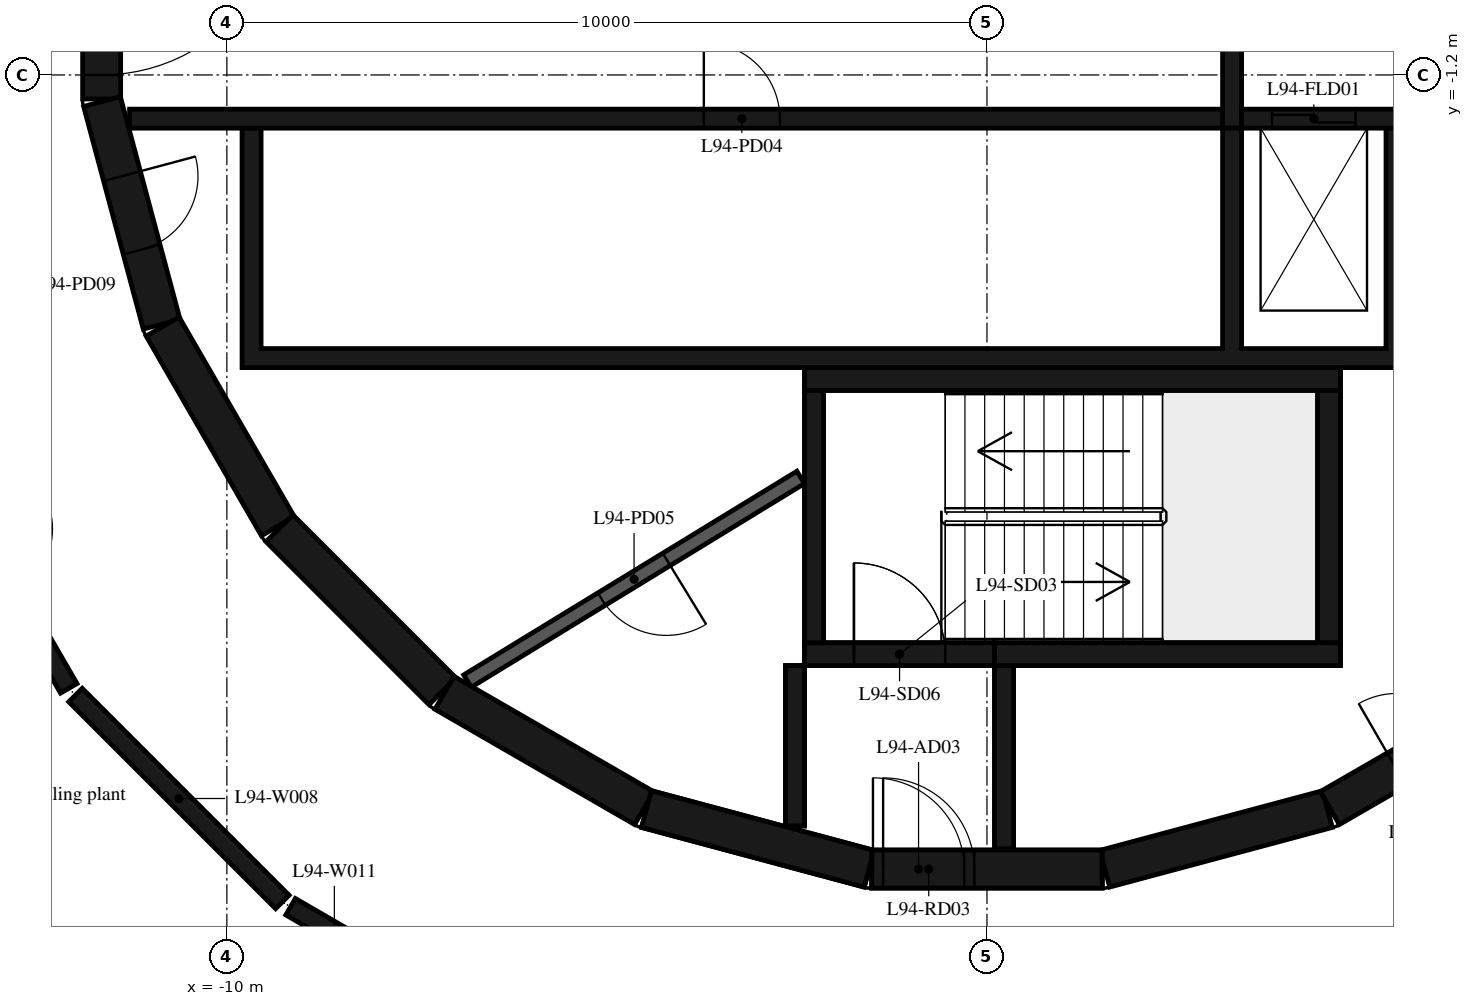
"""IFC4 building model, lengths in metres.
Left out: names, types, materials, properties, quantities, classifications, styles, units other than length and angle.
Written with IfcOpenShell. Run it as: python <this file> out.ifc"""

import sys

from ifc_helpers import new_model, si_unit, direction, frame, frame_2d, origin, place, context, subcontext, project, spatial, polyline, rectangle, outline, extrude, element, fill, save


model = new_model("IFC4")
c1 = context("Model", 3, precision=1e-05, world=origin(), true_north=direction((0.0, 1.0)))
c2 = subcontext(c1, "Body", "Model", "MODEL_VIEW")
j1 = project(units=[si_unit("LENGTHUNIT", "METRE"), si_unit("PLANEANGLEUNIT", "RADIAN")], contexts=[c1])
p1 = place(None, origin())
s1 = spatial("IfcSite", under=j1, at=p1, CompositionType="ELEMENT")
p2 = place(p1, origin())
s2 = spatial("IfcBuilding", under=s1, at=p2, CompositionType="ELEMENT")
p3 = place(p2, frame((0.0, 0.0, 366.2)))
s3 = spatial("IfcBuildingStorey", under=s2, at=p3, CompositionType="ELEMENT", Elevation=366.2)
p4 = place(p3, frame((1.55, -11.643, 0.0), z_axis=(0.0, 0.0, 1.0), x_axis=(0.965948410781, 0.258734743916, 0.0)))
e1 = element("IfcWall", 1, at=p4, inside=s3, PredefinedType="SHEAR", context=c2, shape_type="SweptSolid", body=[
    extrude(rectangle(XDim=3.033, YDim=0.5, at=frame_2d((1.516, 0.0))), origin(), (0.0, 0.0, 1.0), 4.8),
])
p5 = place(p3, frame((4.51, -10.845, 0.0), z_axis=(0.0, 0.0, 1.0), x_axis=(0.865975092491, 0.500087131594, 0.0)))
e2 = element("IfcWall", 2, at=p5, inside=s3, PredefinedType="SHEAR", context=c2, shape_type="SweptSolid", body=[
    extrude(rectangle(XDim=3.033, YDim=0.5, at=frame_2d((1.516, 0.0))), origin(), (0.0, 0.0, 1.0), 4.8),
])
p6 = place(p5, frame((1.016, 0.0, 0.0)))
e3 = element("IfcOpeningElement", 3, at=p6, cuts=e2, PredefinedType="OPENING", context=c2, shape_type="SweptSolid", body=[
    extrude(rectangle(XDim=1.0, YDim=2.4, at=frame_2d((0.5, 1.2))), frame((0.0, 0.26, 0.0), z_axis=(0.0, -1.0, 0.0), x_axis=(1.0, 0.0, 0.0)), (0.0, 0.0, 1.0), 0.52),
])
p7 = place(p3, frame((-11.647, 1.516, 0.0), z_axis=(0.0, 0.0, 1.0), x_axis=(0.0, -1.0, 0.0)))
e4 = element("IfcWall", 4, at=p7, inside=s3, PredefinedType="SHEAR", context=c2, shape_type="SweptSolid", body=[
    extrude(rectangle(XDim=3.033, YDim=0.5, at=frame_2d((1.516, 0.0))), origin(), (0.0, 0.0, 1.0), 4.8),
])
p8 = place(p7, frame((0.316, 0.0, 0.0)))
e5 = element("IfcOpeningElement", 5, at=p8, cuts=e4, PredefinedType="OPENING", context=c2, shape_type="SweptSolid", body=[
    extrude(rectangle(XDim=2.4, YDim=2.1, at=frame_2d((1.2, 1.05))), frame((0.0, 0.26, 0.0), z_axis=(0.0, -1.0, 0.0), x_axis=(1.0, 0.0, 0.0)), (0.0, 0.0, 1.0), 0.52),
])
p9 = place(p3, frame((-11.643, -1.55, 0.0), z_axis=(0.0, 0.0, 1.0), x_axis=(0.258734743916, -0.965948410781, 0.0)))
e6 = element("IfcWall", 6, at=p9, inside=s3, PredefinedType="SHEAR", context=c2, shape_type="SweptSolid", body=[
    extrude(rectangle(XDim=3.033, YDim=0.5, at=frame_2d((1.516, 0.0))), origin(), (0.0, 0.0, 1.0), 4.8),
])
p10 = place(p9, frame((1.016, 0.0, 0.0)))
e7 = element("IfcOpeningElement", 7, at=p10, cuts=e6, PredefinedType="OPENING", context=c2, shape_type="SweptSolid", body=[
    extrude(rectangle(XDim=1.0, YDim=2.4, at=frame_2d((0.5, 1.2))), frame((0.0, 0.26, 0.0), z_axis=(0.0, -1.0, 0.0), x_axis=(1.0, 0.0, 0.0)), (0.0, 0.0, 1.0), 0.52),
])
p11 = place(p3, frame((-10.845, -4.51, 0.0), z_axis=(0.0, 0.0, 1.0), x_axis=(0.500087131594, -0.865975092491, 0.0)))
e8 = element("IfcWall", 8, at=p11, inside=s3, PredefinedType="SHEAR", context=c2, shape_type="SweptSolid", body=[
    extrude(rectangle(XDim=3.033, YDim=0.5, at=frame_2d((1.516, 0.0))), origin(), (0.0, 0.0, 1.0), 4.8),
])
p12 = place(p3, frame((-9.308, -7.164, 0.0), z_axis=(0.0, 0.0, 1.0), x_axis=(0.707106781187, -0.707106781187, 0.0)))
e9 = element("IfcWall", 9, at=p12, inside=s3, PredefinedType="SHEAR", context=c2, shape_type="SweptSolid", body=[
    extrude(rectangle(XDim=3.032, YDim=0.5, at=frame_2d((1.516, 0.0))), origin(), (0.0, 0.0, 1.0), 4.8),
])
for number, where, z_axis, x_axis in (
    (10, (-7.137, -9.329, 0.0), (0.0, 0.0, 1.0), (0.866, -0.5, 0.0)),
    (11, (-4.479, -10.858, 0.0), (0.0, 0.0, 1.0), (0.966, -0.259, 0.0)),
):
    element("IfcWall", number, at=place(p3, frame(where, z_axis=z_axis, x_axis=x_axis)), inside=s3, PredefinedType="SHEAR", context=c2, shape_type="SweptSolid", body=[
        extrude(rectangle(XDim=3.033, YDim=0.5, at=frame_2d((1.516, 0.0))), origin(), (0.0, 0.0, 1.0), 4.8),
    ])
p13 = place(p3, frame((-1.516, -11.647, 0.0), z_axis=(0.0, 0.0, 1.0), x_axis=(1.0, 0.0, 0.0)))
e12 = element("IfcWall", 12, at=p13, inside=s3, PredefinedType="SHEAR", context=c2, shape_type="SweptSolid", body=[
    extrude(rectangle(XDim=3.033, YDim=0.5, at=frame_2d((1.516, 0.0))), origin(), (0.0, 0.0, 1.0), 4.8),
])
p14 = place(p13, frame((0.016, 0.0, 0.0)))
e13 = element("IfcOpeningElement", 13, at=p14, cuts=e12, PredefinedType="OPENING", context=c2, shape_type="SweptSolid", body=[
    extrude(rectangle(XDim=1.2, YDim=2.1, at=frame_2d((0.6, 1.05))), frame((0.0, 0.26, 0.0), z_axis=(0.0, -1.0, 0.0), x_axis=(1.0, 0.0, 0.0)), (0.0, 0.0, 1.0), 0.52),
])
p15 = place(p3, frame((-2.275, -8.67, 0.0), z_axis=(0.0, 0.0, 1.0), x_axis=(0.0, 1.0, 0.0)))
e14 = element("IfcWall", 14, at=p15, inside=s3, PredefinedType="SHEAR", context=c2, shape_type="SweptSolid", body=[
    extrude(rectangle(XDim=3.32, YDim=0.25, at=frame_2d((1.66, 0.0))), origin(), (0.0, 0.0, 1.0), 4.8),
])
p16 = place(p3, frame((-2.4, -5.2, 0.0), z_axis=(0.0, 0.0, 1.0), x_axis=(1.0, 0.0, 0.0)))
e15 = element("IfcWall", 15, at=p16, inside=s3, PredefinedType="SHEAR", context=c2, shape_type="SweptSolid", body=[
    extrude(rectangle(XDim=7.05, YDim=0.3, at=frame_2d((3.525, 0.0))), origin(), (0.0, 0.0, 1.0), 4.8),
])
p17 = place(p3, frame((4.5, -8.67, 0.0), z_axis=(0.0, 0.0, 1.0), x_axis=(0.0, 1.0, 0.0)))
e16 = element("IfcWall", 16, at=p17, inside=s3, PredefinedType="SHEAR", context=c2, shape_type="SweptSolid", body=[
    extrude(rectangle(XDim=3.32, YDim=0.3, at=frame_2d((1.66, 0.0))), origin(), (0.0, 0.0, 1.0), 4.8),
])
p18 = place(p3, frame((0.1, -8.82, 0.0), z_axis=(0.0, 0.0, 1.0), x_axis=(1.0, 0.0, 0.0)))
e17 = element("IfcWall", 17, at=p18, inside=s3, PredefinedType="SHEAR", context=c2, shape_type="SweptSolid", body=[
    extrude(rectangle(XDim=4.55, YDim=0.3, at=frame_2d((2.275, 0.0))), origin(), (0.0, 0.0, 1.0), 4.8),
])
p19 = place(p3, frame((-2.4, -8.82, 0.0), z_axis=(0.0, 0.0, 1.0), x_axis=(1.0, 0.0, 0.0)))
e18 = element("IfcWall", 18, at=p19, inside=s3, PredefinedType="SHEAR", context=c2, shape_type="SweptSolid", body=[
    extrude(rectangle(XDim=2.5, YDim=0.3, at=frame_2d((1.25, 0.0))), origin(), (0.0, 0.0, 1.0), 4.8),
])
p20 = place(p19, frame((0.65, 0.0, 0.0)))
e19 = element("IfcOpeningElement", 19, at=p20, cuts=e18, PredefinedType="OPENING", context=c2, shape_type="SweptSolid", body=[
    extrude(rectangle(XDim=1.2, YDim=2.1, at=frame_2d((0.6, 1.05))), frame((0.0, 0.16, 0.0), z_axis=(0.0, -1.0, 0.0), x_axis=(1.0, 0.0, 0.0)), (0.0, 0.0, 1.0), 0.32),
])
p21 = place(p3, frame((-2.525, -8.97, 0.0), z_axis=(0.0, 0.0, 1.0), x_axis=(0.0, -1.0, 0.0)))
e20 = element("IfcWall", 20, at=p21, inside=s3, PredefinedType="SHEAR", context=c2, shape_type="SweptSolid", body=[
    extrude(rectangle(XDim=2.11, YDim=0.25, at=frame_2d((1.055, 0.0))), origin(), (0.0, 0.0, 1.0), 4.8),
])
p22 = place(p3, frame((0.225, -8.97, 0.0), z_axis=(0.0, 0.0, 1.0), x_axis=(0.0, -1.0, 0.0)))
e21 = element("IfcWall", 21, at=p22, inside=s3, PredefinedType="SHEAR", context=c2, shape_type="SweptSolid", body=[
    extrude(rectangle(XDim=2.41, YDim=0.25, at=frame_2d((1.205, 0.0))), origin(), (0.0, 0.0, 1.0), 4.8),
])
p23 = place(p3, origin())
e22 = element("IfcWall", 22, at=p23, inside=s3, PredefinedType="SHEAR", context=c2, shape_type="SweptSolid", body=[
    extrude(outline(polyline([(9.8, -4.8), (9.8, -1.9), (9.55, -1.9), (9.55, -4.8), (7.65, -4.8), (7.65, -1.9), (7.4, -1.9), (7.4, -4.8), (5.5, -4.8), (5.5, -1.9), (5.25, -1.9), (5.25, -4.8), (3.35, -4.8), (3.35, -1.9), (3.1, -1.9), (3.1, -4.8), (-9.55, -4.8), (-9.55, -1.9), (-9.8, -1.9), (-9.8, -4.8), (-9.8, -5.05), (9.8, -5.05), (9.8, -4.8)])), origin(), (0.0, 0.0, 1.0), 4.8),
])
p24 = place(p3, frame((-11.28, -1.775, 0.0), z_axis=(0.0, 0.0, 1.0), x_axis=(1.0, 0.0, 0.0)))
e23 = element("IfcWall", 23, at=p24, inside=s3, PredefinedType="SHEAR", context=c2, shape_type="SweptSolid", body=[
    extrude(rectangle(XDim=14.38, YDim=0.25, at=frame_2d((7.19, 0.0))), origin(), (0.0, 0.0, 1.0), 4.8),
])
p25 = place(p24, frame((7.555, 0.0, 0.0)))
e24 = element("IfcOpeningElement", 24, at=p25, cuts=e23, PredefinedType="OPENING", context=c2, shape_type="SweptSolid", body=[
    extrude(rectangle(XDim=1.0, YDim=2.4, at=frame_2d((0.5, 1.2))), frame((0.0, 0.135, 0.0), z_axis=(0.0, -1.0, 0.0), x_axis=(1.0, 0.0, 0.0)), (0.0, 0.0, 1.0), 0.27),
])
p26 = place(p3, frame((3.35, -1.775, 0.0), z_axis=(0.0, 0.0, 1.0), x_axis=(1.0, 0.0, 0.0)))
e25 = element("IfcWall", 25, at=p26, inside=s3, PredefinedType="SHEAR", context=c2, shape_type="SweptSolid", body=[
    extrude(rectangle(XDim=7.93, YDim=0.25, at=frame_2d((3.965, 0.0))), origin(), (0.0, 0.0, 1.0), 4.8),
])
p27 = place(p26, frame((0.4, 0.0, 0.0)))
e26 = element("IfcOpeningElement", 26, at=p27, cuts=e25, PredefinedType="OPENING", context=c2, shape_type="SweptSolid", body=[
    extrude(rectangle(XDim=1.1, YDim=2.4, at=frame_2d((0.55, 1.2))), frame((0.0, 0.135, 0.0), z_axis=(0.0, -1.0, 0.0), x_axis=(1.0, 0.0, 0.0)), (0.0, 0.0, 1.0), 0.27),
])
p28 = place(p26, frame((2.55, 0.0, 0.0)))
e27 = element("IfcOpeningElement", 27, at=p28, cuts=e25, PredefinedType="OPENING", context=c2, shape_type="SweptSolid", body=[
    extrude(rectangle(XDim=1.1, YDim=2.4, at=frame_2d((0.55, 1.2))), frame((0.0, 0.135, 0.0), z_axis=(0.0, -1.0, 0.0), x_axis=(1.0, 0.0, 0.0)), (0.0, 0.0, 1.0), 0.27),
])
p29 = place(p26, frame((4.7, 0.0, 0.0)))
e28 = element("IfcOpeningElement", 28, at=p29, cuts=e25, PredefinedType="OPENING", context=c2, shape_type="SweptSolid", body=[
    extrude(rectangle(XDim=1.1, YDim=2.4, at=frame_2d((0.55, 1.2))), frame((0.0, 0.135, 0.0), z_axis=(0.0, -1.0, 0.0), x_axis=(1.0, 0.0, 0.0)), (0.0, 0.0, 1.0), 0.27),
])
p30 = place(p3, frame((3.225, -1.9, 0.0), z_axis=(0.0, 0.0, 1.0), x_axis=(0.0, 1.0, 0.0)))
e29 = element("IfcWall", 29, at=p30, inside=s3, PredefinedType="SHEAR", context=c2, shape_type="SweptSolid", body=[
    extrude(rectangle(XDim=3.8, YDim=0.25, at=frame_2d((1.9, 0.0))), origin(), (0.0, 0.0, 1.0), 4.8),
])
p31 = place(p3, frame((-2.451, -6.495, 0.0), z_axis=(0.0, 0.0, 1.0), x_axis=(-0.853250115418, -0.521501908471, 0.0)))
e30 = element("IfcWall", 30, at=p31, inside=s3, PredefinedType="PARTITIONING", context=c2, shape_type="SweptSolid", body=[
    extrude(rectangle(XDim=5.137, YDim=0.19, at=frame_2d((2.569, 0.0))), origin(), (0.0, 0.0, 1.0), 4.8),
])
p32 = place(p31, frame((2.069, 0.0, 0.0)))
e31 = element("IfcOpeningElement", 31, at=p32, cuts=e30, PredefinedType="OPENING", context=c2, shape_type="SweptSolid", body=[
    extrude(rectangle(XDim=1.0, YDim=2.4, at=frame_2d((0.5, 1.2))), frame((0.0, 0.105, 0.0), z_axis=(0.0, -1.0, 0.0), x_axis=(1.0, 0.0, 0.0)), (0.0, 0.0, 1.0), 0.21),
])
p33 = place(p3, frame((-2.275, -8.67, 5.2), z_axis=(0.0, 0.0, 1.0), x_axis=(0.0, 1.0, 0.0)))
e32 = element("IfcWall", 32, at=p33, inside=s3, PredefinedType="SHEAR", context=c2, shape_type="SweptSolid", body=[
    extrude(rectangle(XDim=3.32, YDim=0.25, at=frame_2d((1.66, 0.0))), origin(), (0.0, 0.0, 1.0), 3.4),
])
p34 = place(p3, frame((-2.4, -5.2, 5.2), z_axis=(0.0, 0.0, 1.0), x_axis=(1.0, 0.0, 0.0)))
e33 = element("IfcWall", 33, at=p34, inside=s3, PredefinedType="SHEAR", context=c2, shape_type="SweptSolid", body=[
    extrude(rectangle(XDim=7.05, YDim=0.3, at=frame_2d((3.525, 0.0))), origin(), (0.0, 0.0, 1.0), 3.4),
])
p35 = place(p3, frame((4.5, -8.67, 5.2), z_axis=(0.0, 0.0, 1.0), x_axis=(0.0, 1.0, 0.0)))
e34 = element("IfcWall", 34, at=p35, inside=s3, PredefinedType="SHEAR", context=c2, shape_type="SweptSolid", body=[
    extrude(rectangle(XDim=3.32, YDim=0.3, at=frame_2d((1.66, 0.0))), origin(), (0.0, 0.0, 1.0), 3.4),
])
p36 = place(p3, frame((0.1, -8.82, 5.2), z_axis=(0.0, 0.0, 1.0), x_axis=(1.0, 0.0, 0.0)))
e35 = element("IfcWall", 35, at=p36, inside=s3, PredefinedType="SHEAR", context=c2, shape_type="SweptSolid", body=[
    extrude(rectangle(XDim=4.55, YDim=0.3, at=frame_2d((2.275, 0.0))), origin(), (0.0, 0.0, 1.0), 3.4),
])
p37 = place(p3, frame((-2.4, -8.82, 5.2), z_axis=(0.0, 0.0, 1.0), x_axis=(1.0, 0.0, 0.0)))
e36 = element("IfcWall", 36, at=p37, inside=s3, PredefinedType="SHEAR", context=c2, shape_type="SweptSolid", body=[
    extrude(rectangle(XDim=2.5, YDim=0.3, at=frame_2d((1.25, 0.0))), origin(), (0.0, 0.0, 1.0), 3.4),
])
p38 = place(p37, frame((0.65, 0.0, 0.0)))
e37 = element("IfcOpeningElement", 37, at=p38, cuts=e36, PredefinedType="OPENING", context=c2, shape_type="SweptSolid", body=[
    extrude(rectangle(XDim=1.2, YDim=2.1, at=frame_2d((0.6, 1.05))), frame((0.0, 0.16, 0.0), z_axis=(0.0, -1.0, 0.0), x_axis=(1.0, 0.0, 0.0)), (0.0, 0.0, 1.0), 0.32),
])
p39 = place(p3, frame((-2.525, -8.97, 5.2), z_axis=(0.0, 0.0, 1.0), x_axis=(0.0, -1.0, 0.0)))
e38 = element("IfcWall", 38, at=p39, inside=s3, PredefinedType="SHEAR", context=c2, shape_type="SweptSolid", body=[
    extrude(rectangle(XDim=2.11, YDim=0.25, at=frame_2d((1.055, 0.0))), origin(), (0.0, 0.0, 1.0), 3.4),
])
p40 = place(p3, frame((0.225, -8.97, 5.2), z_axis=(0.0, 0.0, 1.0), x_axis=(0.0, -1.0, 0.0)))
e39 = element("IfcWall", 39, at=p40, inside=s3, PredefinedType="SHEAR", context=c2, shape_type="SweptSolid", body=[
    extrude(rectangle(XDim=2.41, YDim=0.25, at=frame_2d((1.205, 0.0))), origin(), (0.0, 0.0, 1.0), 3.4),
])
p41 = place(p3, frame((-4.479, -10.858, 5.2), z_axis=(0.0, 0.0, 1.0), x_axis=(0.965948410781, -0.258734743916, 0.0)))
e40 = element("IfcWall", 40, at=p41, inside=s3, PredefinedType="SHEAR", context=c2, shape_type="SweptSolid", body=[
    extrude(rectangle(XDim=3.033, YDim=0.5, at=frame_2d((1.516, 0.0))), origin(), (0.0, 0.0, 1.0), 3.4),
])
p42 = place(p3, frame((-1.516, -11.647, 5.2), z_axis=(0.0, 0.0, 1.0), x_axis=(1.0, 0.0, 0.0)))
e41 = element("IfcWall", 41, at=p42, inside=s3, PredefinedType="SHEAR", context=c2, shape_type="SweptSolid", body=[
    extrude(rectangle(XDim=3.033, YDim=0.5, at=frame_2d((1.516, 0.0))), origin(), (0.0, 0.0, 1.0), 3.4),
])
p43 = place(p42, frame((0.15, 0.0, 0.0)))
e42 = element("IfcOpeningElement", 42, at=p43, cuts=e41, PredefinedType="OPENING", context=c2, shape_type="SweptSolid", body=[
    extrude(rectangle(XDim=1.2, YDim=2.1, at=frame_2d((0.6, 1.05))), frame((0.0, 0.26, 0.0), z_axis=(0.0, -1.0, 0.0), x_axis=(1.0, 0.0, 0.0)), (0.0, 0.0, 1.0), 0.52),
])
p44 = place(p3, frame((-14.007, -5.938, 0.0), z_axis=(0.0, 0.0, 1.0), x_axis=(0.500708693508, -0.865615852585, 0.0)))
e43 = element("IfcWall", 43, at=p44, inside=s3, PredefinedType="PARTITIONING", context=c2, shape_type="SweptSolid", body=[
    extrude(rectangle(XDim=3.849, YDim=0.25, at=frame_2d((1.925, 0.0))), origin(), (0.0, 0.0, 1.0), 4.8),
])
p45 = place(p44, frame((1.425, 0.0, 0.0)))
e44 = element("IfcOpeningElement", 44, at=p45, cuts=e43, PredefinedType="OPENING", context=c2, shape_type="SweptSolid", body=[
    extrude(rectangle(XDim=1.0, YDim=2.1, at=frame_2d((0.5, 1.05))), frame((0.0, 0.135, 0.0), z_axis=(0.0, -1.0, 0.0), x_axis=(1.0, 0.0, 0.0)), (0.0, 0.0, 1.0), 0.27),
])
p46 = place(p3, frame((-11.992, -9.358, 0.0), z_axis=(0.0, 0.0, 1.0), x_axis=(0.707106781187, -0.707106781187, 0.0)))
e45 = element("IfcWall", 45, at=p46, inside=s3, PredefinedType="PARTITIONING", context=c2, shape_type="SweptSolid", body=[
    extrude(rectangle(XDim=3.849, YDim=0.25, at=frame_2d((1.925, 0.0))), origin(), (0.0, 0.0, 1.0), 4.8),
])
p47 = place(p3, frame((-9.162, -12.143, 0.0), z_axis=(0.0, 0.0, 1.0), x_axis=(0.865225325987, -0.501383221968, 0.0)))
e46 = element("IfcWall", 46, at=p47, inside=s3, PredefinedType="PARTITIONING", context=c2, shape_type="SweptSolid", body=[
    extrude(rectangle(XDim=1.331, YDim=0.25, at=frame_2d((0.666, 0.0))), origin(), (0.0, 0.0, 1.0), 4.8),
])
p48 = place(p20, origin())
e47 = element("IfcDoor", 47, at=p48, inside=s3, OperationType="SINGLE_SWING_LEFT", PredefinedType="DOOR", context=c2, shape_type="SweptSolid", body=[
    extrude(rectangle(XDim=1.2, YDim=2.1, at=frame_2d((0.6, 1.05))), frame((0.0, 0.025, 0.0), z_axis=(0.0, -1.0, 0.0), x_axis=(1.0, 0.0, 0.0)), (0.0, 0.0, 1.0), 0.05),
])
fill(e19, e47)
p49 = place(p14, origin())
e48 = element("IfcDoor", 48, at=p49, inside=s3, OperationType="SINGLE_SWING_RIGHT", PredefinedType="DOOR", context=c2, shape_type="SweptSolid", body=[
    extrude(rectangle(XDim=1.2, YDim=2.1, at=frame_2d((0.6, 1.05))), frame((0.0, 0.025, 0.0), z_axis=(0.0, -1.0, 0.0), x_axis=(1.0, 0.0, 0.0)), (0.0, 0.0, 1.0), 0.05),
])
fill(e13, e48)
p50 = place(p8, origin())
e49 = element("IfcDoor", 49, at=p50, inside=s3, OperationType="DOUBLE_DOOR_SINGLE_SWING", PredefinedType="DOOR", context=c2, shape_type="SweptSolid", body=[
    extrude(rectangle(XDim=2.4, YDim=2.1, at=frame_2d((1.2, 1.05))), frame((0.0, 0.025, 0.0), z_axis=(0.0, -1.0, 0.0), x_axis=(1.0, 0.0, 0.0)), (0.0, 0.0, 1.0), 0.05),
])
fill(e5, e49)
p51 = place(p27, origin())
e50 = element("IfcDoor", 50, at=p51, inside=s3, OperationType="DOUBLE_DOOR_SLIDING", PredefinedType="DOOR", context=c2, shape_type="SweptSolid", body=[
    extrude(rectangle(XDim=1.1, YDim=2.4, at=frame_2d((0.55, 1.2))), frame((0.0, 0.025, 0.0), z_axis=(0.0, -1.0, 0.0), x_axis=(1.0, 0.0, 0.0)), (0.0, 0.0, 1.0), 0.05),
])
fill(e26, e50)
p52 = place(p25, origin())
e51 = element("IfcDoor", 51, at=p52, inside=s3, OperationType="SINGLE_SWING_LEFT", PredefinedType="DOOR", context=c2, shape_type="SweptSolid", body=[
    extrude(rectangle(XDim=1.0, YDim=2.4, at=frame_2d((0.5, 1.2))), frame((0.0, 0.025, 0.0), z_axis=(0.0, -1.0, 0.0), x_axis=(1.0, 0.0, 0.0)), (0.0, 0.0, 1.0), 0.05),
])
fill(e24, e51)
p53 = place(p32, origin())
e52 = element("IfcDoor", 52, at=p53, inside=s3, OperationType="SINGLE_SWING_RIGHT", PredefinedType="DOOR", context=c2, shape_type="SweptSolid", body=[
    extrude(rectangle(XDim=1.0, YDim=2.4, at=frame_2d((0.5, 1.2))), frame((0.0, 0.025, 0.0), z_axis=(0.0, -1.0, 0.0), x_axis=(1.0, 0.0, 0.0)), (0.0, 0.0, 1.0), 0.05),
])
fill(e31, e52)
p54 = place(p10, origin())
e53 = element("IfcDoor", 53, at=p54, inside=s3, OperationType="SINGLE_SWING_RIGHT", PredefinedType="DOOR", context=c2, shape_type="SweptSolid", body=[
    extrude(rectangle(XDim=1.0, YDim=2.4, at=frame_2d((0.5, 1.2))), frame((0.0, 0.025, 0.0), z_axis=(0.0, -1.0, 0.0), x_axis=(1.0, 0.0, 0.0)), (0.0, 0.0, 1.0), 0.05),
])
fill(e7, e53)
p55 = place(p38, origin())
e54 = element("IfcDoor", 54, at=p55, inside=s3, OperationType="SINGLE_SWING_RIGHT", PredefinedType="DOOR", context=c2, shape_type="SweptSolid", body=[
    extrude(rectangle(XDim=1.2, YDim=2.1, at=frame_2d((0.6, 1.05))), frame((0.0, 0.025, 0.0), z_axis=(0.0, -1.0, 0.0), x_axis=(1.0, 0.0, 0.0)), (0.0, 0.0, 1.0), 0.05),
])
fill(e37, e54)
p56 = place(p43, origin())
e55 = element("IfcDoor", 55, at=p56, inside=s3, OperationType="SINGLE_SWING_LEFT", PredefinedType="DOOR", context=c2, shape_type="SweptSolid", body=[
    extrude(rectangle(XDim=1.2, YDim=2.1, at=frame_2d((0.6, 1.05))), frame((0.0, 0.025, 0.0), z_axis=(0.0, -1.0, 0.0), x_axis=(1.0, 0.0, 0.0)), (0.0, 0.0, 1.0), 0.05),
])
fill(e42, e55)
save(model, sys.argv[1])
